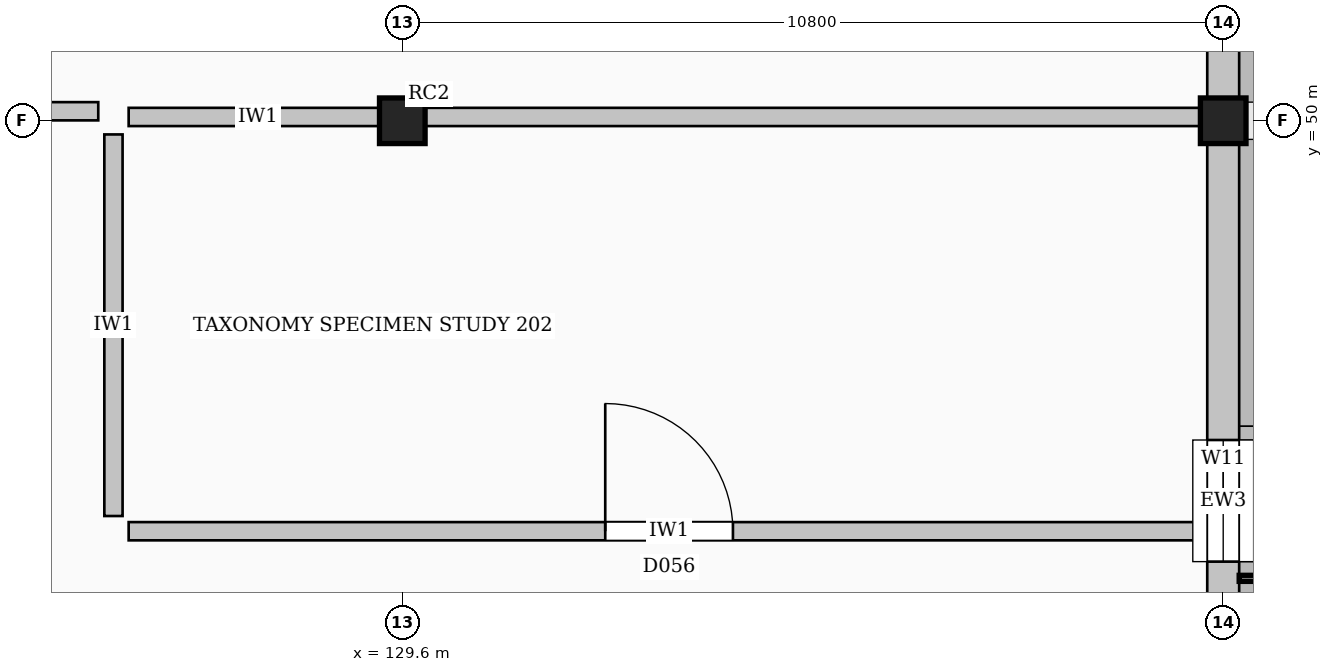
"""IFC4 building model, lengths in metres.
Left out: names, types, materials, properties, quantities, classifications, styles, units other than length and angle.
Written with IfcOpenShell. Run it as: python <this file> out.ifc"""

import sys

from ifc_helpers import new_model, si_unit, direction, frame, frame_2d, origin, origin_2d, place, context, subcontext, project, spatial, rectangle, extrude, element, fill, save


model = new_model("IFC4")
c1 = context("Model", 3, precision=1e-05, world=origin(), true_north=direction((0.0, 1.0)))
c2 = subcontext(c1, "Body", "Model", "MODEL_VIEW")
j1 = project(units=[si_unit("LENGTHUNIT", "METRE"), si_unit("PLANEANGLEUNIT", "RADIAN")], contexts=[c1])
p1 = place(None, origin())
s1 = spatial("IfcSite", under=j1, at=p1, CompositionType="ELEMENT")
p2 = place(p1, origin())
s2 = spatial("IfcBuilding", under=s1, at=p2, CompositionType="ELEMENT")
p3 = place(p2, frame((0.0, 0.0, 9.6)))
s3 = spatial("IfcBuildingStorey", under=s2, at=p3, CompositionType="ELEMENT", Elevation=9.6)
for number, where, z_axis, x_axis in (
    (1, (129.6, 50.0, 0.0), (0.0, 0.0, 1.0), (1.0, 0.0, 0.0)),
    (2, (140.4, 50.0, 0.0), (0.0, 0.0, 1.0), (1.0, 0.0, 0.0)),
):
    element("IfcColumn", number, at=place(p3, frame(where, z_axis=z_axis, x_axis=x_axis)), inside=s3, PredefinedType="COLUMN", context=c2, shape_type="SweptSolid", body=[
        extrude(rectangle(XDim=0.6, YDim=0.6, at=origin_2d()), origin(), (0.0, 0.0, 1.0), 4.8),
    ])
p4 = place(p3, frame((140.4, 40.145, 0.0), z_axis=(0.0, 0.0, 1.0), x_axis=(0.0, 1.0, 0.0)))
e3 = element("IfcWall", 3, at=p4, inside=s3, PredefinedType="STANDARD", context=c2, shape_type="SweptSolid", body=[
    extrude(rectangle(XDim=9.71, YDim=0.42, at=frame_2d((4.855, 0.0))), origin(), (0.0, 0.0, 1.0), 4.13),
])
p5 = place(p4, frame((4.055, 0.0, 1.2)))
e4 = element("IfcOpeningElement", 4, at=p5, cuts=e3, PredefinedType="OPENING", context=c2, shape_type="SweptSolid", body=[
    extrude(rectangle(XDim=1.6, YDim=1.8, at=frame_2d((0.8, 0.9))), frame((0.0, 0.22, 0.0), z_axis=(0.0, -1.0, 0.0), x_axis=(1.0, 0.0, 0.0)), (0.0, 0.0, 1.0), 0.44),
])
p6 = place(p3, frame((140.4, 50.145, 0.0), z_axis=(0.0, 0.0, 1.0), x_axis=(0.0, 1.0, 0.0)))
e5 = element("IfcWall", 5, at=p6, inside=s3, PredefinedType="STANDARD", context=c2, shape_type="SweptSolid", body=[
    extrude(rectangle(XDim=11.71, YDim=0.42, at=frame_2d((5.855, 0.0))), origin(), (0.0, 0.0, 1.0), 4.13),
])
p7 = place(p6, frame((4.805, 0.0, 1.2)))
e6 = element("IfcOpeningElement", 6, at=p7, cuts=e5, PredefinedType="OPENING", context=c2, shape_type="SweptSolid", body=[
    extrude(rectangle(XDim=2.1, YDim=1.6, at=frame_2d((1.05, 0.8))), frame((0.0, 0.22, 0.0), z_axis=(0.0, -1.0, 0.0), x_axis=(1.0, 0.0, 0.0)), (0.0, 0.0, 1.0), 0.44),
])
p8 = place(p3, frame((126.0, 44.6, 0.0), z_axis=(0.0, 0.0, 1.0), x_axis=(1.0, 0.0, 0.0)))
e7 = element("IfcWall", 7, at=p8, inside=s3, PredefinedType="SOLIDWALL", context=c2, shape_type="SweptSolid", body=[
    extrude(rectangle(XDim=14.22, YDim=0.24, at=frame_2d((7.11, 0.0))), origin(), (0.0, 0.0, 1.0), 4.52),
])
p9 = place(p8, frame((6.27, 0.0, 0.0)))
e8 = element("IfcOpeningElement", 8, at=p9, cuts=e7, PredefinedType="OPENING", context=c2, shape_type="SweptSolid", body=[
    extrude(rectangle(XDim=1.68, YDim=2.52, at=frame_2d((0.84, 1.26))), frame((0.0, 0.13, 0.0), z_axis=(0.0, -1.0, 0.0), x_axis=(1.0, 0.0, 0.0)), (0.0, 0.0, 1.0), 0.26),
])
p10 = place(p3, frame((118.98, 50.125, 0.0), z_axis=(0.0, 0.0, 1.0), x_axis=(1.0, 0.0, 0.0)))
e9 = element("IfcWall", 9, at=p10, inside=s3, PredefinedType="SOLIDWALL", context=c2, shape_type="SweptSolid", body=[
    extrude(rectangle(XDim=6.62, YDim=0.24, at=frame_2d((3.31, 0.0))), origin(), (0.0, 0.0, 1.0), 3.929),
])
p11 = place(p10, frame((2.21, 0.0, 0.0)))
e10 = element("IfcOpeningElement", 10, at=p11, cuts=e9, PredefinedType="OPENING", context=c2, shape_type="SweptSolid", body=[
    extrude(rectangle(XDim=2.2, YDim=2.6, at=frame_2d((1.1, 1.3))), frame((0.0, 0.13, 0.0), z_axis=(0.0, -1.0, 0.0), x_axis=(1.0, 0.0, 0.0)), (0.0, 0.0, 1.0), 0.26),
])
p12 = place(p3, frame((126.0, 50.05, 0.0), z_axis=(0.0, 0.0, 1.0), x_axis=(1.0, 0.0, 0.0)))
e11 = element("IfcWall", 11, at=p12, inside=s3, PredefinedType="SOLIDWALL", context=c2, shape_type="SweptSolid", body=[
    extrude(rectangle(XDim=3.4, YDim=0.24, at=frame_2d((1.7, 0.0))), origin(), (0.0, 0.0, 1.0), 3.929),
])
p13 = place(p3, frame((129.8, 50.05, 0.0), z_axis=(0.0, 0.0, 1.0), x_axis=(1.0, 0.0, 0.0)))
e12 = element("IfcWall", 12, at=p13, inside=s3, PredefinedType="SOLIDWALL", context=c2, shape_type="SweptSolid", body=[
    extrude(rectangle(XDim=10.42, YDim=0.24, at=frame_2d((5.21, 0.0))), origin(), (0.0, 0.0, 1.0), 4.13),
])
p14 = place(p3, frame((125.8, 44.8, 0.0), z_axis=(0.0, 0.0, 1.0), x_axis=(0.0, 1.0, 0.0)))
e13 = element("IfcWall", 13, at=p14, inside=s3, PredefinedType="SOLIDWALL", context=c2, shape_type="SweptSolid", body=[
    extrude(rectangle(XDim=5.02, YDim=0.24, at=frame_2d((2.51, 0.0))), origin(), (0.0, 0.0, 1.0), 4.52),
])
p15 = place(p5, origin())
e14 = element("IfcWindow", 14, at=p15, inside=s3, PartitioningType="SINGLE_PANEL", PredefinedType="WINDOW", context=c2, shape_type="SweptSolid", body=[
    extrude(rectangle(XDim=1.6, YDim=1.8, at=frame_2d((0.8, 0.9))), frame((0.0, 0.03, 0.0), z_axis=(0.0, -1.0, 0.0), x_axis=(1.0, 0.0, 0.0)), (0.0, 0.0, 1.0), 0.06),
])
fill(e4, e14)
p16 = place(p9, origin())
e15 = element("IfcDoor", 15, at=p16, inside=s3, OperationType="SINGLE_SWING_LEFT", PredefinedType="DOOR", context=c2, shape_type="SweptSolid", body=[
    extrude(rectangle(XDim=1.68, YDim=2.52, at=frame_2d((0.84, 1.26))), frame((0.0, 0.025, 0.0), z_axis=(0.0, -1.0, 0.0), x_axis=(1.0, 0.0, 0.0)), (0.0, 0.0, 1.0), 0.05),
])
fill(e8, e15)
save(model, sys.argv[1])
